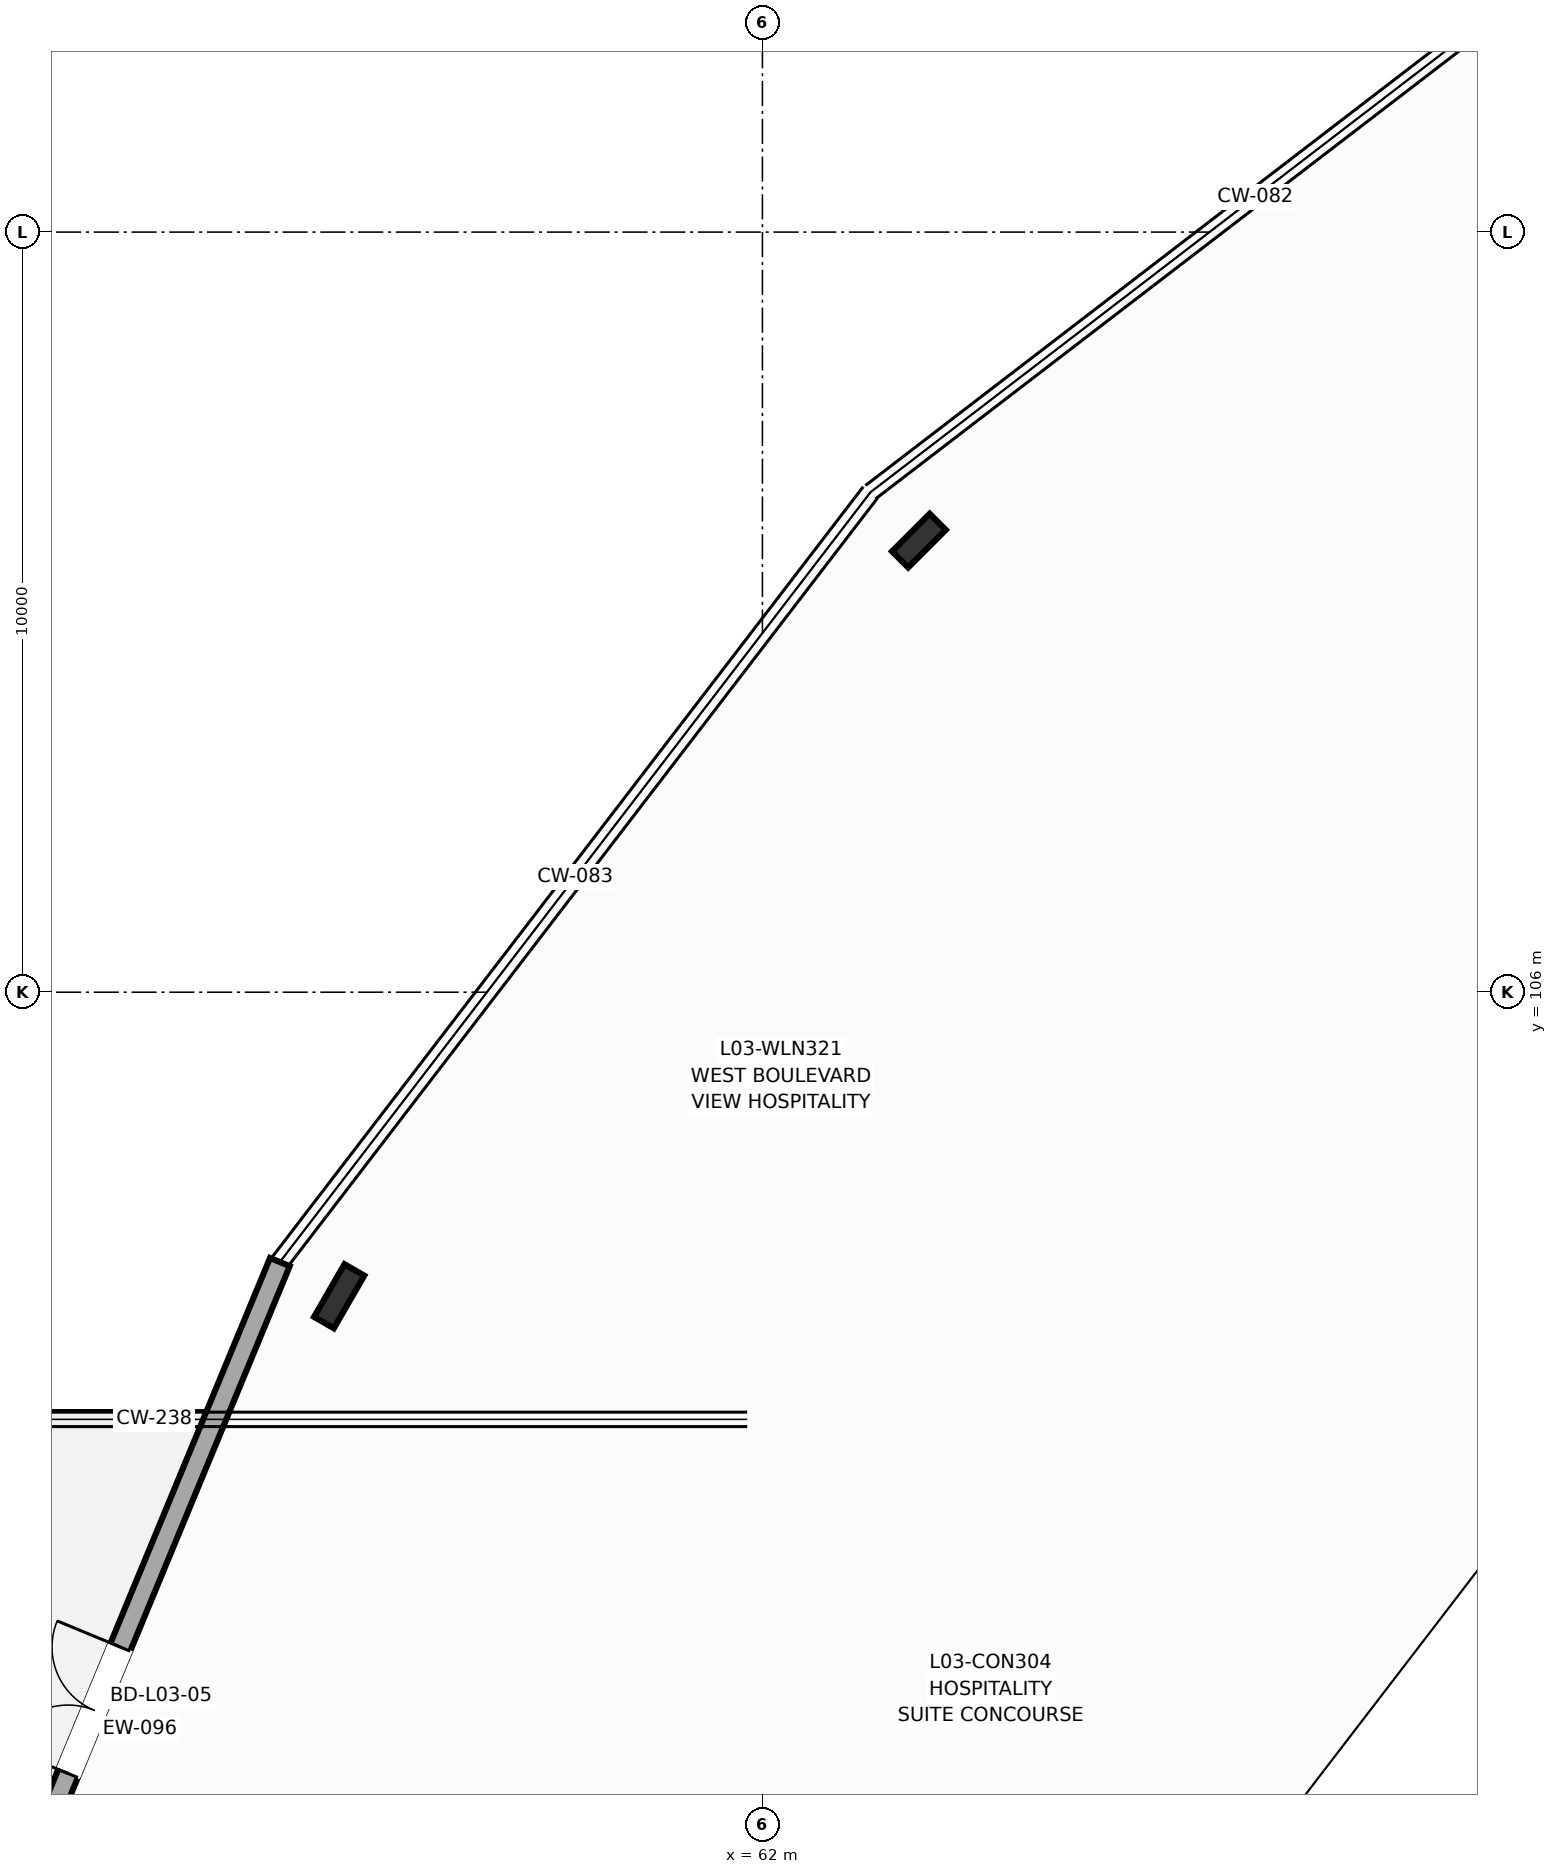
"""IFC4 building model, lengths in metres.
Left out: names, types, materials, properties, quantities, classifications, styles, units other than length and angle.
Written with IfcOpenShell. Run it as: python <this file> out.ifc"""

import sys

from ifc_helpers import new_model, si_unit, direction, frame, frame_2d, origin, origin_2d, place, context, subcontext, project, spatial, rectangle, i_section, extrude, element, fill, save


model = new_model("IFC4")
c1 = context("Model", 3, precision=1e-05, world=origin(), true_north=direction((0.0, 1.0)))
c2 = subcontext(c1, "Body", "Model", "MODEL_VIEW")
j1 = project(units=[si_unit("LENGTHUNIT", "METRE"), si_unit("PLANEANGLEUNIT", "RADIAN")], contexts=[c1])
p1 = place(None, origin())
s1 = spatial("IfcSite", under=j1, at=p1, CompositionType="ELEMENT")
p2 = place(p1, origin())
s2 = spatial("IfcBuilding", under=s1, at=p2, CompositionType="ELEMENT")
p3 = place(p2, frame((0.0, 0.0, 13.5)))
s3 = spatial("IfcBuildingStorey", under=s2, at=p3, CompositionType="ELEMENT", Elevation=13.5)
p4 = place(p3, frame((64.059, 111.941, 0.0), z_axis=(0.0, 0.0, 1.0), x_axis=(-0.707106781187, 0.707106781187, 0.0)))
e1 = element("IfcColumn", 1, at=p4, inside=s3, PredefinedType="COLUMN", context=c2, shape_type="SweptSolid", body=[
    extrude(i_section(OverallWidth=0.3, OverallDepth=0.7, WebThickness=0.017, FlangeThickness=0.032, at=origin_2d()), origin(), (0.0, 0.0, 1.0), 4.5),
])
p5 = place(p3, frame((56.431, 102.0, 0.0), z_axis=(0.0, 0.0, 1.0), x_axis=(-0.866025403784, 0.5, 0.0)))
e2 = element("IfcColumn", 2, at=p5, inside=s3, PredefinedType="COLUMN", context=c2, shape_type="SweptSolid", body=[
    extrude(i_section(OverallWidth=0.3, OverallDepth=0.8, WebThickness=0.018, FlangeThickness=0.033, at=origin_2d()), origin(), (0.0, 0.0, 1.0), 4.5),
])
p6 = place(p3, frame((55.651, 102.45, 0.0), z_axis=(0.0, 0.0, 1.0), x_axis=(-0.382653578879, -0.923891897665, 0.0)))
e3 = element("IfcWall", 3, at=p6, inside=s3, PredefinedType="SOLIDWALL", context=c2, shape_type="SweptSolid", body=[
    extrude(rectangle(XDim=12.766, YDim=0.28, at=frame_2d((6.383, 0.0))), origin(), (0.0, 0.0, 1.0), 3.1),
])
p7 = place(p6, frame((5.483, 0.0, 0.0)))
e4 = element("IfcOpeningElement", 4, at=p7, cuts=e3, PredefinedType="OPENING", context=c2, shape_type="SweptSolid", body=[
    extrude(rectangle(XDim=1.8, YDim=2.35, at=frame_2d((0.9, 1.175))), frame((0.0, 0.15, 0.0), z_axis=(0.0, -1.0, 0.0), x_axis=(1.0, 0.0, 0.0)), (0.0, 0.0, 1.0), 0.3),
])
p8 = place(p3, frame((75.812, 99.571, 0.0), z_axis=(0.0, 0.0, 1.0), x_axis=(-0.608807390719, -0.793318070515, 0.0)))
e5 = element("IfcWall", 5, at=p8, inside=s3, PredefinedType="SOLIDWALL", context=c2, shape_type="SweptSolid", body=[
    extrude(rectangle(XDim=7.213, YDim=0.37, at=frame_2d((3.606, 0.0))), origin(), (0.0, 0.0, 1.0), 3.3),
])
p9 = place(p7, frame((1.8, 0.0, 0.0), z_axis=(0.0, 0.0, 1.0), x_axis=(-1.0, 0.0, 0.0)))
e6 = element("IfcDoor", 6, at=p9, inside=s3, OperationType="DOUBLE_DOOR_SINGLE_SWING", PredefinedType="DOOR", context=c2, shape_type="SweptSolid", body=[
    extrude(rectangle(XDim=1.8, YDim=2.35, at=frame_2d((0.9, 1.175))), frame((0.0, 0.025, 0.0), z_axis=(0.0, -1.0, 0.0), x_axis=(1.0, 0.0, 0.0)), (0.0, 0.0, 1.0), 0.05),
])
fill(e4, e6)
save(model, sys.argv[1])
